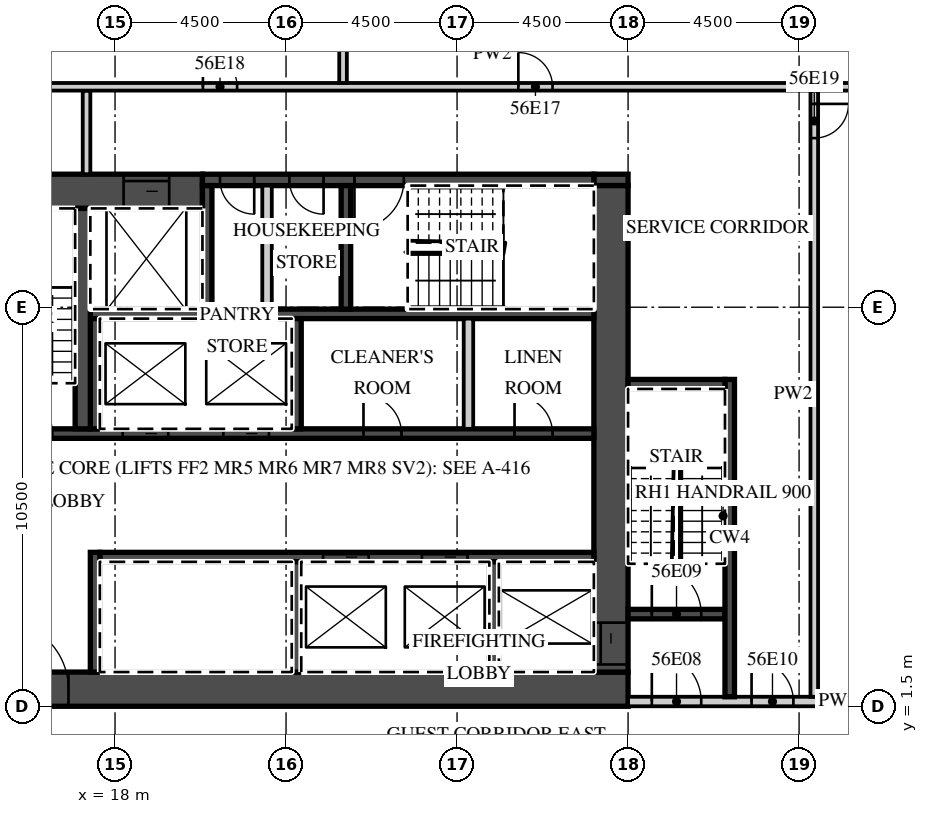
"""IFC4 building model, lengths in metres.
Left out: names, types, materials, properties, quantities, classifications, styles, units other than length and angle.
Written with IfcOpenShell. Run it as: python <this file> out.ifc"""

import sys

from ifc_helpers import new_model, si_unit, direction, frame, frame_2d, origin, place, context, subcontext, project, spatial, rectangle, extrude, element, fill, save


model = new_model("IFC4")
c1 = context("Model", 3, precision=1e-05, world=origin(), true_north=direction((0.0, 1.0)))
c2 = subcontext(c1, "Body", "Model", "MODEL_VIEW")
j1 = project(units=[si_unit("LENGTHUNIT", "METRE"), si_unit("PLANEANGLEUNIT", "RADIAN")], contexts=[c1])
p1 = place(None, origin())
s1 = spatial("IfcSite", under=j1, at=p1, CompositionType="ELEMENT")
p2 = place(p1, origin())
s2 = spatial("IfcBuilding", under=s1, at=p2, CompositionType="ELEMENT")
p3 = place(p2, frame((0.0, 0.0, 230.9)))
s3 = spatial("IfcBuildingStorey", under=s2, at=p3, CompositionType="ELEMENT", Elevation=230.9)
p4 = place(p3, frame((13.5, 1.95, 0.0), z_axis=(0.0, 0.0, 1.0), x_axis=(1.0, 0.0, 0.0)))
e1 = element("IfcWall", 1, at=p4, inside=s3, PredefinedType="SHEAR", context=c2, shape_type="SweptSolid", body=[
    extrude(rectangle(XDim=18.0, YDim=0.9, at=frame_2d((9.0, 0.0))), origin(), (0.0, 0.0, 1.0), 3.02),
])
p5 = place(p4, frame((1.475, 0.0, 0.0)))
e2 = element("IfcOpeningElement", 2, at=p5, cuts=e1, PredefinedType="OPENING", context=c2, shape_type="SweptSolid", body=[
    extrude(rectangle(XDim=1.8, YDim=2.1, at=frame_2d((0.9, 1.05))), frame((0.0, 0.46, 0.0), z_axis=(0.0, -1.0, 0.0), x_axis=(1.0, 0.0, 0.0)), (0.0, 0.0, 1.0), 0.92),
])
p6 = place(p3, frame((13.5, 15.05, 0.0), z_axis=(0.0, 0.0, 1.0), x_axis=(1.0, 0.0, 0.0)))
e3 = element("IfcWall", 3, at=p6, inside=s3, PredefinedType="SHEAR", context=c2, shape_type="SweptSolid", body=[
    extrude(rectangle(XDim=6.8, YDim=0.9, at=frame_2d((3.4, 0.0))), origin(), (0.0, 0.0, 1.0), 3.02),
])
p7 = place(p6, frame((4.725, 0.0, 0.0)))
e4 = element("IfcOpeningElement", 4, at=p7, cuts=e3, PredefinedType="OPENING", context=c2, shape_type="SweptSolid", body=[
    extrude(rectangle(XDim=1.2, YDim=2.1, at=frame_2d((0.6, 1.05))), frame((0.0, 0.46, 0.0), z_axis=(0.0, -1.0, 0.0), x_axis=(1.0, 0.0, 0.0)), (0.0, 0.0, 1.0), 0.92),
])
p8 = place(p3, frame((30.6, 15.35, 0.0), z_axis=(0.0, 0.0, 1.0), x_axis=(1.0, 0.0, 0.0)))
e5 = element("IfcWall", 5, at=p8, inside=s3, PredefinedType="SHEAR", context=c2, shape_type="SweptSolid", body=[
    extrude(rectangle(XDim=0.9, YDim=0.3, at=frame_2d((0.45, 0.0))), origin(), (0.0, 0.0, 1.0), 3.02),
])
p9 = place(p3, frame((20.3, 15.35, 0.0), z_axis=(0.0, 0.0, 1.0), x_axis=(1.0, 0.0, 0.0)))
e6 = element("IfcWall", 6, at=p9, inside=s3, PredefinedType="SHEAR", context=c2, shape_type="SweptSolid", body=[
    extrude(rectangle(XDim=10.3, YDim=0.3, at=frame_2d((5.15, 0.0))), origin(), (0.0, 0.0, 1.0), 3.02),
])
p10 = place(p9, frame((4.0, 0.0, 0.0)))
e7 = element("IfcOpeningElement", 7, at=p10, cuts=e6, PredefinedType="OPENING", context=c2, shape_type="SweptSolid", body=[
    extrude(rectangle(XDim=1.3, YDim=2.1, at=frame_2d((0.65, 1.05))), frame((0.0, 0.16, 0.0), z_axis=(0.0, -1.0, 0.0), x_axis=(1.0, 0.0, 0.0)), (0.0, 0.0, 1.0), 0.32),
])
p11 = place(p9, frame((2.288, 0.0, 0.0)))
e8 = element("IfcOpeningElement", 8, at=p11, cuts=e6, PredefinedType="OPENING", context=c2, shape_type="SweptSolid", body=[
    extrude(rectangle(XDim=0.9, YDim=2.1, at=frame_2d((0.45, 1.05))), frame((0.0, 0.16, 0.0), z_axis=(0.0, -1.0, 0.0), x_axis=(1.0, 0.0, 0.0)), (0.0, 0.0, 1.0), 0.32),
])
p12 = place(p9, frame((0.462, 0.0, 0.0)))
e9 = element("IfcOpeningElement", 9, at=p12, cuts=e6, PredefinedType="OPENING", context=c2, shape_type="SweptSolid", body=[
    extrude(rectangle(XDim=0.9, YDim=2.1, at=frame_2d((0.45, 1.05))), frame((0.0, 0.16, 0.0), z_axis=(0.0, -1.0, 0.0), x_axis=(1.0, 0.0, 0.0)), (0.0, 0.0, 1.0), 0.32),
])
p13 = place(p3, frame((31.05, 2.4, 0.0), z_axis=(0.0, 0.0, 1.0), x_axis=(0.0, 1.0, 0.0)))
e10 = element("IfcWall", 10, at=p13, inside=s3, PredefinedType="SHEAR", context=c2, shape_type="SweptSolid", body=[
    extrude(rectangle(XDim=12.8, YDim=0.9, at=frame_2d((6.4, 0.0))), origin(), (0.0, 0.0, 1.0), 3.02),
])
p14 = place(p13, frame((0.2, 0.0, 0.0)))
e11 = element("IfcOpeningElement", 11, at=p14, cuts=e10, PredefinedType="OPENING", context=c2, shape_type="SweptSolid", body=[
    extrude(rectangle(XDim=1.1, YDim=2.1, at=frame_2d((0.55, 1.05))), frame((0.0, 0.46, 0.0), z_axis=(0.0, -1.0, 0.0), x_axis=(1.0, 0.0, 0.0)), (0.0, 0.0, 1.0), 0.92),
])
p15 = place(p3, frame((17.6, 5.425, 0.0), z_axis=(0.0, 0.0, 1.0), x_axis=(1.0, 0.0, 0.0)))
e12 = element("IfcWall", 12, at=p15, inside=s3, PredefinedType="SHEAR", context=c2, shape_type="SweptSolid", body=[
    extrude(rectangle(XDim=13.0, YDim=0.25, at=frame_2d((6.5, 0.0))), origin(), (0.0, 0.0, 1.0), 3.02),
])
p16 = place(p15, frame((8.475, 0.0, 0.0)))
e13 = element("IfcOpeningElement", 13, at=p16, cuts=e12, PredefinedType="OPENING", context=c2, shape_type="SweptSolid", body=[
    extrude(rectangle(XDim=1.2, YDim=2.1, at=frame_2d((0.6, 1.05))), frame((0.0, 0.135, 0.0), z_axis=(0.0, -1.0, 0.0), x_axis=(1.0, 0.0, 0.0)), (0.0, 0.0, 1.0), 0.27),
])
p17 = place(p15, frame((5.875, 0.0, 0.0)))
e14 = element("IfcOpeningElement", 14, at=p17, cuts=e12, PredefinedType="OPENING", context=c2, shape_type="SweptSolid", body=[
    extrude(rectangle(XDim=1.2, YDim=2.1, at=frame_2d((0.6, 1.05))), frame((0.0, 0.135, 0.0), z_axis=(0.0, -1.0, 0.0), x_axis=(1.0, 0.0, 0.0)), (0.0, 0.0, 1.0), 0.27),
])
p18 = place(p3, frame((17.475, 2.4, 0.0), z_axis=(0.0, 0.0, 1.0), x_axis=(0.0, 1.0, 0.0)))
e15 = element("IfcWall", 15, at=p18, inside=s3, PredefinedType="SHEAR", context=c2, shape_type="SweptSolid", body=[
    extrude(rectangle(XDim=3.15, YDim=0.25, at=frame_2d((1.575, 0.0))), origin(), (0.0, 0.0, 1.0), 3.02),
])
for number, where, z_axis, x_axis in (
    (16, (27.975, 2.4, 0.0), (0.0, 0.0, 1.0), (0.0, 1.0, 0.0)),
    (17, (22.775, 2.4, 0.0), (0.0, 0.0, 1.0), (0.0, 1.0, 0.0)),
):
    element("IfcWall", number, at=place(p3, frame(where, z_axis=z_axis, x_axis=x_axis)), inside=s3, PredefinedType="SHEAR", context=c2, shape_type="SweptSolid", body=[
        extrude(rectangle(XDim=2.9, YDim=0.25, at=frame_2d((1.45, 0.0))), origin(), (0.0, 0.0, 1.0), 3.02),
    ])
p19 = place(p3, frame((14.4, 8.675, 0.0), z_axis=(0.0, 0.0, 1.0), x_axis=(1.0, 0.0, 0.0)))
e18 = element("IfcWall", 18, at=p19, inside=s3, PredefinedType="SHEAR", context=c2, shape_type="SweptSolid", body=[
    extrude(rectangle(XDim=16.2, YDim=0.25, at=frame_2d((8.1, 0.0))), origin(), (0.0, 0.0, 1.0), 3.02),
])
p20 = place(p19, frame((6.45, 0.0, 0.0)))
e19 = element("IfcOpeningElement", 19, at=p20, cuts=e18, PredefinedType="OPENING", context=c2, shape_type="SweptSolid", body=[
    extrude(rectangle(XDim=1.2, YDim=2.1, at=frame_2d((0.6, 1.05))), frame((0.0, 0.135, 0.0), z_axis=(0.0, -1.0, 0.0), x_axis=(1.0, 0.0, 0.0)), (0.0, 0.0, 1.0), 0.27),
])
p21 = place(p19, frame((3.8, 0.0, 0.0)))
e20 = element("IfcOpeningElement", 20, at=p21, cuts=e18, PredefinedType="OPENING", context=c2, shape_type="SweptSolid", body=[
    extrude(rectangle(XDim=1.2, YDim=2.1, at=frame_2d((0.6, 1.05))), frame((0.0, 0.135, 0.0), z_axis=(0.0, -1.0, 0.0), x_axis=(1.0, 0.0, 0.0)), (0.0, 0.0, 1.0), 0.27),
])
p22 = place(p19, frame((0.65, 0.0, 0.0)))
e21 = element("IfcOpeningElement", 21, at=p22, cuts=e18, PredefinedType="OPENING", context=c2, shape_type="SweptSolid", body=[
    extrude(rectangle(XDim=1.3, YDim=2.1, at=frame_2d((0.65, 1.05))), frame((0.0, 0.135, 0.0), z_axis=(0.0, -1.0, 0.0), x_axis=(1.0, 0.0, 0.0)), (0.0, 0.0, 1.0), 0.27),
])
p23 = place(p19, frame((14.113, 0.0, 0.0)))
e22 = element("IfcOpeningElement", 22, at=p23, cuts=e18, PredefinedType="OPENING", context=c2, shape_type="SweptSolid", body=[
    extrude(rectangle(XDim=1.0, YDim=2.1, at=frame_2d((0.5, 1.05))), frame((0.0, 0.135, 0.0), z_axis=(0.0, -1.0, 0.0), x_axis=(1.0, 0.0, 0.0)), (0.0, 0.0, 1.0), 0.27),
])
p24 = place(p19, frame((10.137, 0.0, 0.0)))
e23 = element("IfcOpeningElement", 23, at=p24, cuts=e18, PredefinedType="OPENING", context=c2, shape_type="SweptSolid", body=[
    extrude(rectangle(XDim=1.0, YDim=2.1, at=frame_2d((0.5, 1.05))), frame((0.0, 0.135, 0.0), z_axis=(0.0, -1.0, 0.0), x_axis=(1.0, 0.0, 0.0)), (0.0, 0.0, 1.0), 0.27),
])
p25 = place(p3, frame((17.35, 11.825, 0.0), z_axis=(0.0, 0.0, 1.0), x_axis=(1.0, 0.0, 0.0)))
e24 = element("IfcWall", 24, at=p25, inside=s3, PredefinedType="SHEAR", context=c2, shape_type="SweptSolid", body=[
    extrude(rectangle(XDim=13.25, YDim=0.25, at=frame_2d((6.625, 0.0))), origin(), (0.0, 0.0, 1.0), 3.02),
])
for number, where, z_axis, x_axis in (
    (25, (17.475, 8.8, 0.0), (0.0, 0.0, 1.0), (0.0, 1.0, 0.0)),
    (26, (22.775, 8.8, 0.0), (0.0, 0.0, 1.0), (0.0, 1.0, 0.0)),
):
    element("IfcWall", number, at=place(p3, frame(where, z_axis=z_axis, x_axis=x_axis)), inside=s3, PredefinedType="SHEAR", context=c2, shape_type="SweptSolid", body=[
        extrude(rectangle(XDim=2.9, YDim=0.25, at=frame_2d((1.45, 0.0))), origin(), (0.0, 0.0, 1.0), 3.02),
    ])
p26 = place(p3, frame((27.3, 8.8, 0.0), z_axis=(0.0, 0.0, 1.0), x_axis=(0.0, 1.0, 0.0)))
e27 = element("IfcWall", 27, at=p26, inside=s3, PredefinedType="PARTITIONING", context=c2, shape_type="SweptSolid", body=[
    extrude(rectangle(XDim=2.9, YDim=0.25, at=frame_2d((1.45, 0.0))), origin(), (0.0, 0.0, 1.0), 3.02),
])
p27 = place(p3, frame((17.15, 8.8, 0.0), z_axis=(0.0, 0.0, 1.0), x_axis=(0.0, 1.0, 0.0)))
e28 = element("IfcWall", 28, at=p27, inside=s3, PredefinedType="SHEAR", context=c2, shape_type="SweptSolid", body=[
    extrude(rectangle(XDim=5.8, YDim=0.4, at=frame_2d((2.9, 0.0))), origin(), (0.0, 0.0, 1.0), 3.02),
])
for number, where, z_axis, x_axis in (
    (29, (20.425, 11.95, 0.0), (0.0, 0.0, 1.0), (0.0, 1.0, 0.0)),
    (30, (24.075, 11.95, 0.0), (0.0, 0.0, 1.0), (0.0, 1.0, 0.0)),
):
    element("IfcWall", number, at=place(p3, frame(where, z_axis=z_axis, x_axis=x_axis)), inside=s3, PredefinedType="SHEAR", context=c2, shape_type="SweptSolid", body=[
        extrude(rectangle(XDim=3.25, YDim=0.25, at=frame_2d((1.625, 0.0))), origin(), (0.0, 0.0, 1.0), 3.02),
    ])
p28 = place(p3, frame((22.0, 11.95, 0.0), z_axis=(0.0, 0.0, 1.0), x_axis=(0.0, 1.0, 0.0)))
e31 = element("IfcWall", 31, at=p28, inside=s3, PredefinedType="PARTITIONING", context=c2, shape_type="SweptSolid", body=[
    extrude(rectangle(XDim=3.25, YDim=0.25, at=frame_2d((1.625, 0.0))), origin(), (0.0, 0.0, 1.0), 3.02),
])
p29 = place(p3, frame((31.5, 1.625, 0.0), z_axis=(0.0, 0.0, 1.0), x_axis=(1.0, 0.0, 0.0)))
e32 = element("IfcWall", 32, at=p29, inside=s3, PredefinedType="PARTITIONING", context=c2, shape_type="SweptSolid", body=[
    extrude(rectangle(XDim=11.04, YDim=0.25, at=frame_2d((5.52, 0.0))), origin(), (0.0, 0.0, 1.0), 3.02),
])
p30 = place(p29, frame((0.625, 0.0, 0.0)))
e33 = element("IfcOpeningElement", 33, at=p30, cuts=e32, PredefinedType="OPENING", context=c2, shape_type="SweptSolid", body=[
    extrude(rectangle(XDim=1.3, YDim=2.1, at=frame_2d((0.65, 1.05))), frame((0.0, 0.135, 0.0), z_axis=(0.0, -1.0, 0.0), x_axis=(1.0, 0.0, 0.0)), (0.0, 0.0, 1.0), 0.27),
])
p31 = place(p29, frame((3.25, 0.0, 0.0)))
e34 = element("IfcOpeningElement", 34, at=p31, cuts=e32, PredefinedType="OPENING", context=c2, shape_type="SweptSolid", body=[
    extrude(rectangle(XDim=1.1, YDim=2.1, at=frame_2d((0.55, 1.05))), frame((0.0, 0.135, 0.0), z_axis=(0.0, -1.0, 0.0), x_axis=(1.0, 0.0, 0.0)), (0.0, 0.0, 1.0), 0.27),
])
p32 = place(p3, frame((31.5, 3.925, 0.0), z_axis=(0.0, 0.0, 1.0), x_axis=(1.0, 0.0, 0.0)))
e35 = element("IfcWall", 35, at=p32, inside=s3, PredefinedType="SHEAR", context=c2, shape_type="SweptSolid", body=[
    extrude(rectangle(XDim=2.55, YDim=0.25, at=frame_2d((1.275, 0.0))), origin(), (0.0, 0.0, 1.0), 3.02),
])
p33 = place(p32, frame((0.625, 0.0, 0.0)))
e36 = element("IfcOpeningElement", 36, at=p33, cuts=e35, PredefinedType="OPENING", context=c2, shape_type="SweptSolid", body=[
    extrude(rectangle(XDim=1.3, YDim=2.1, at=frame_2d((0.65, 1.05))), frame((0.0, 0.135, 0.0), z_axis=(0.0, -1.0, 0.0), x_axis=(1.0, 0.0, 0.0)), (0.0, 0.0, 1.0), 0.27),
])
p34 = place(p3, frame((34.175, 1.75, 0.0), z_axis=(0.0, 0.0, 1.0), x_axis=(0.0, 1.0, 0.0)))
e37 = element("IfcWall", 37, at=p34, inside=s3, PredefinedType="SHEAR", context=c2, shape_type="SweptSolid", body=[
    extrude(rectangle(XDim=8.35, YDim=0.25, at=frame_2d((4.175, 0.0))), origin(), (0.0, 0.0, 1.0), 3.02),
])
p35 = place(p3, frame((31.5, 9.975, 0.0), z_axis=(0.0, 0.0, 1.0), x_axis=(1.0, 0.0, 0.0)))
e38 = element("IfcWall", 38, at=p35, inside=s3, PredefinedType="SHEAR", context=c2, shape_type="SweptSolid", body=[
    extrude(rectangle(XDim=2.55, YDim=0.25, at=frame_2d((1.275, 0.0))), origin(), (0.0, 0.0, 1.0), 3.02),
])
p36 = place(p3, frame((17.25, 15.5, 0.0), z_axis=(0.0, 0.0, 1.0), x_axis=(0.0, 1.0, 0.0)))
e39 = element("IfcWall", 39, at=p36, inside=s3, PredefinedType="PARTITIONING", context=c2, shape_type="SweptSolid", body=[
    extrude(rectangle(XDim=2.2, YDim=0.2, at=frame_2d((1.1, 0.0))), origin(), (0.0, 0.0, 1.0), 3.02),
])
p37 = place(p3, frame((36.4, 1.75, 0.0), z_axis=(0.0, 0.0, 1.0), x_axis=(0.0, 1.0, 0.0)))
e40 = element("IfcWall", 40, at=p37, inside=s3, PredefinedType="PARTITIONING", context=c2, shape_type="SweptSolid", body=[
    extrude(rectangle(XDim=15.95, YDim=0.2, at=frame_2d((7.975, 0.0))), origin(), (0.0, 0.0, 1.0), 3.02),
])
p38 = place(p37, frame((14.7, 0.0, 0.0)))
e41 = element("IfcOpeningElement", 41, at=p38, cuts=e40, PredefinedType="OPENING", context=c2, shape_type="SweptSolid", body=[
    extrude(rectangle(XDim=0.9, YDim=2.1, at=frame_2d((0.45, 1.05))), frame((0.0, 0.11, 0.0), z_axis=(0.0, -1.0, 0.0), x_axis=(1.0, 0.0, 0.0)), (0.0, 0.0, 1.0), 0.22),
])
p39 = place(p3, frame((13.6, 17.8, 0.0), z_axis=(0.0, 0.0, 1.0), x_axis=(1.0, 0.0, 0.0)))
e42 = element("IfcWall", 42, at=p39, inside=s3, PredefinedType="PARTITIONING", context=c2, shape_type="SweptSolid", body=[
    extrude(rectangle(XDim=28.657, YDim=0.2, at=frame_2d((14.329, 0.0))), origin(), (0.0, 0.0, 1.0), 3.02),
])
p40 = place(p39, frame((15.012, 0.0, 0.0)))
e43 = element("IfcOpeningElement", 43, at=p40, cuts=e42, PredefinedType="OPENING", context=c2, shape_type="SweptSolid", body=[
    extrude(rectangle(XDim=0.9, YDim=2.1, at=frame_2d((0.45, 1.05))), frame((0.0, 0.11, 0.0), z_axis=(0.0, -1.0, 0.0), x_axis=(1.0, 0.0, 0.0)), (0.0, 0.0, 1.0), 0.22),
])
p41 = place(p39, frame((6.712, 0.0, 0.0)))
e44 = element("IfcOpeningElement", 44, at=p41, cuts=e42, PredefinedType="OPENING", context=c2, shape_type="SweptSolid", body=[
    extrude(rectangle(XDim=0.9, YDim=2.1, at=frame_2d((0.45, 1.05))), frame((0.0, 0.11, 0.0), z_axis=(0.0, -1.0, 0.0), x_axis=(1.0, 0.0, 0.0)), (0.0, 0.0, 1.0), 0.22),
])
p42 = place(p3, frame((24.0, 17.9, 0.0), z_axis=(0.0, 0.0, 1.0), x_axis=(0.0, 1.0, 0.0)))
e45 = element("IfcWall", 45, at=p42, inside=s3, PredefinedType="PARTITIONING", context=c2, shape_type="SweptSolid", body=[
    extrude(rectangle(XDim=3.22, YDim=0.2, at=frame_2d((1.61, 0.0))), origin(), (0.0, 0.0, 1.0), 3.02),
])
p43 = place(p20, origin())
e46 = element("IfcDoor", 46, at=p43, inside=s3, OperationType="SLIDING_TO_LEFT", PredefinedType="DOOR", context=c2, shape_type="SweptSolid", body=[
    extrude(rectangle(XDim=1.2, YDim=2.1, at=frame_2d((0.6, 1.05))), frame((0.0, 0.025, 0.0), z_axis=(0.0, -1.0, 0.0), x_axis=(1.0, 0.0, 0.0)), (0.0, 0.0, 1.0), 0.05),
])
fill(e19, e46)
p44 = place(p21, origin())
e47 = element("IfcDoor", 47, at=p44, inside=s3, OperationType="SLIDING_TO_RIGHT", PredefinedType="DOOR", context=c2, shape_type="SweptSolid", body=[
    extrude(rectangle(XDim=1.2, YDim=2.1, at=frame_2d((0.6, 1.05))), frame((0.0, 0.025, 0.0), z_axis=(0.0, -1.0, 0.0), x_axis=(1.0, 0.0, 0.0)), (0.0, 0.0, 1.0), 0.05),
])
fill(e20, e47)
p45 = place(p16, origin())
e48 = element("IfcDoor", 48, at=p45, inside=s3, OperationType="SLIDING_TO_LEFT", PredefinedType="DOOR", context=c2, shape_type="SweptSolid", body=[
    extrude(rectangle(XDim=1.2, YDim=2.1, at=frame_2d((0.6, 1.05))), frame((0.0, 0.025, 0.0), z_axis=(0.0, -1.0, 0.0), x_axis=(1.0, 0.0, 0.0)), (0.0, 0.0, 1.0), 0.05),
])
fill(e13, e48)
p46 = place(p17, origin())
e49 = element("IfcDoor", 49, at=p46, inside=s3, OperationType="SLIDING_TO_RIGHT", PredefinedType="DOOR", context=c2, shape_type="SweptSolid", body=[
    extrude(rectangle(XDim=1.2, YDim=2.1, at=frame_2d((0.6, 1.05))), frame((0.0, 0.025, 0.0), z_axis=(0.0, -1.0, 0.0), x_axis=(1.0, 0.0, 0.0)), (0.0, 0.0, 1.0), 0.05),
])
fill(e14, e49)
p47 = place(p7, origin())
e50 = element("IfcDoor", 50, at=p47, inside=s3, OperationType="SLIDING_TO_LEFT", PredefinedType="DOOR", context=c2, shape_type="SweptSolid", body=[
    extrude(rectangle(XDim=1.2, YDim=2.1, at=frame_2d((0.6, 1.05))), frame((0.0, 0.025, 0.0), z_axis=(0.0, -1.0, 0.0), x_axis=(1.0, 0.0, 0.0)), (0.0, 0.0, 1.0), 0.05),
])
fill(e4, e50)
p48 = place(p14, origin())
e51 = element("IfcDoor", 51, at=p48, inside=s3, OperationType="SLIDING_TO_LEFT", PredefinedType="DOOR", context=c2, shape_type="SweptSolid", body=[
    extrude(rectangle(XDim=1.1, YDim=2.1, at=frame_2d((0.55, 1.05))), frame((0.0, 0.025, 0.0), z_axis=(0.0, -1.0, 0.0), x_axis=(1.0, 0.0, 0.0)), (0.0, 0.0, 1.0), 0.05),
])
fill(e11, e51)
p49 = place(p5, origin())
e52 = element("IfcDoor", 52, at=p49, inside=s3, OperationType="DOUBLE_DOOR_DOUBLE_SWING", PredefinedType="DOOR", context=c2, shape_type="SweptSolid", body=[
    extrude(rectangle(XDim=1.8, YDim=2.1, at=frame_2d((0.9, 1.05))), frame((0.0, 0.025, 0.0), z_axis=(0.0, -1.0, 0.0), x_axis=(1.0, 0.0, 0.0)), (0.0, 0.0, 1.0), 0.05),
])
fill(e2, e52)
p50 = place(p30, origin())
e53 = element("IfcDoor", 53, at=p50, inside=s3, OperationType="SINGLE_SWING_LEFT", PredefinedType="DOOR", context=c2, shape_type="SweptSolid", body=[
    extrude(rectangle(XDim=1.3, YDim=2.1, at=frame_2d((0.65, 1.05))), frame((0.0, 0.025, 0.0), z_axis=(0.0, -1.0, 0.0), x_axis=(1.0, 0.0, 0.0)), (0.0, 0.0, 1.0), 0.05),
])
fill(e33, e53)
p51 = place(p33, origin())
e54 = element("IfcDoor", 54, at=p51, inside=s3, OperationType="SINGLE_SWING_LEFT", PredefinedType="DOOR", context=c2, shape_type="SweptSolid", body=[
    extrude(rectangle(XDim=1.3, YDim=2.1, at=frame_2d((0.65, 1.05))), frame((0.0, 0.025, 0.0), z_axis=(0.0, -1.0, 0.0), x_axis=(1.0, 0.0, 0.0)), (0.0, 0.0, 1.0), 0.05),
])
fill(e36, e54)
p52 = place(p31, origin())
e55 = element("IfcDoor", 55, at=p52, inside=s3, OperationType="SINGLE_SWING_LEFT", PredefinedType="DOOR", context=c2, shape_type="SweptSolid", body=[
    extrude(rectangle(XDim=1.1, YDim=2.1, at=frame_2d((0.55, 1.05))), frame((0.0, 0.025, 0.0), z_axis=(0.0, -1.0, 0.0), x_axis=(1.0, 0.0, 0.0)), (0.0, 0.0, 1.0), 0.05),
])
fill(e34, e55)
p53 = place(p10, origin())
e56 = element("IfcDoor", 56, at=p53, inside=s3, OperationType="SINGLE_SWING_LEFT", PredefinedType="DOOR", context=c2, shape_type="SweptSolid", body=[
    extrude(rectangle(XDim=1.3, YDim=2.1, at=frame_2d((0.65, 1.05))), frame((0.0, 0.025, 0.0), z_axis=(0.0, -1.0, 0.0), x_axis=(1.0, 0.0, 0.0)), (0.0, 0.0, 1.0), 0.05),
])
fill(e7, e56)
p54 = place(p11, origin())
e57 = element("IfcDoor", 57, at=p54, inside=s3, OperationType="SINGLE_SWING_RIGHT", PredefinedType="DOOR", context=c2, shape_type="SweptSolid", body=[
    extrude(rectangle(XDim=0.9, YDim=2.1, at=frame_2d((0.45, 1.05))), frame((0.0, 0.025, 0.0), z_axis=(0.0, -1.0, 0.0), x_axis=(1.0, 0.0, 0.0)), (0.0, 0.0, 1.0), 0.05),
])
fill(e8, e57)
p55 = place(p12, origin())
e58 = element("IfcDoor", 58, at=p55, inside=s3, OperationType="SINGLE_SWING_RIGHT", PredefinedType="DOOR", context=c2, shape_type="SweptSolid", body=[
    extrude(rectangle(XDim=0.9, YDim=2.1, at=frame_2d((0.45, 1.05))), frame((0.0, 0.025, 0.0), z_axis=(0.0, -1.0, 0.0), x_axis=(1.0, 0.0, 0.0)), (0.0, 0.0, 1.0), 0.05),
])
fill(e9, e58)
p56 = place(p23, origin())
e59 = element("IfcDoor", 59, at=p56, inside=s3, OperationType="SINGLE_SWING_LEFT", PredefinedType="DOOR", context=c2, shape_type="SweptSolid", body=[
    extrude(rectangle(XDim=1.0, YDim=2.1, at=frame_2d((0.5, 1.05))), frame((0.0, 0.025, 0.0), z_axis=(0.0, -1.0, 0.0), x_axis=(1.0, 0.0, 0.0)), (0.0, 0.0, 1.0), 0.05),
])
fill(e22, e59)
p57 = place(p24, origin())
e60 = element("IfcDoor", 60, at=p57, inside=s3, OperationType="SINGLE_SWING_LEFT", PredefinedType="DOOR", context=c2, shape_type="SweptSolid", body=[
    extrude(rectangle(XDim=1.0, YDim=2.1, at=frame_2d((0.5, 1.05))), frame((0.0, 0.025, 0.0), z_axis=(0.0, -1.0, 0.0), x_axis=(1.0, 0.0, 0.0)), (0.0, 0.0, 1.0), 0.05),
])
fill(e23, e60)
p58 = place(p40, origin())
e61 = element("IfcDoor", 61, at=p58, inside=s3, OperationType="SINGLE_SWING_LEFT", PredefinedType="DOOR", context=c2, shape_type="SweptSolid", body=[
    extrude(rectangle(XDim=0.9, YDim=2.1, at=frame_2d((0.45, 1.05))), frame((0.0, 0.025, 0.0), z_axis=(0.0, -1.0, 0.0), x_axis=(1.0, 0.0, 0.0)), (0.0, 0.0, 1.0), 0.05),
])
fill(e43, e61)
p59 = place(p41, origin())
e62 = element("IfcDoor", 62, at=p59, inside=s3, OperationType="SINGLE_SWING_LEFT", PredefinedType="DOOR", context=c2, shape_type="SweptSolid", body=[
    extrude(rectangle(XDim=0.9, YDim=2.1, at=frame_2d((0.45, 1.05))), frame((0.0, 0.025, 0.0), z_axis=(0.0, -1.0, 0.0), x_axis=(1.0, 0.0, 0.0)), (0.0, 0.0, 1.0), 0.05),
])
fill(e44, e62)
p60 = place(p38, origin())
e63 = element("IfcDoor", 63, at=p60, inside=s3, OperationType="SINGLE_SWING_RIGHT", PredefinedType="DOOR", context=c2, shape_type="SweptSolid", body=[
    extrude(rectangle(XDim=0.9, YDim=2.1, at=frame_2d((0.45, 1.05))), frame((0.0, 0.025, 0.0), z_axis=(0.0, -1.0, 0.0), x_axis=(1.0, 0.0, 0.0)), (0.0, 0.0, 1.0), 0.05),
])
fill(e41, e63)
save(model, sys.argv[1])
